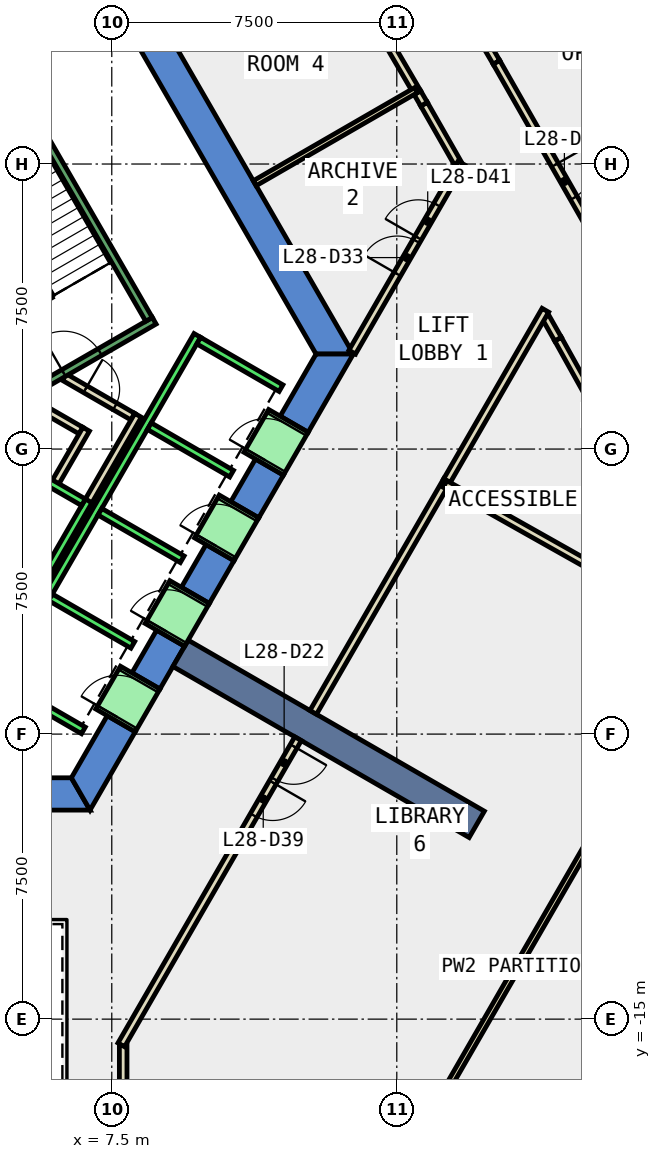
"""IFC4 building model, lengths in metres.
Left out: names, types, materials, properties, quantities, classifications, styles, units other than length and angle.
Written with IfcOpenShell. Run it as: python <this file> out.ifc"""

import sys

from ifc_helpers import new_model, si_unit, direction, frame, frame_2d, origin, place, context, subcontext, project, spatial, polyline, rectangle, outline, extrude, element, fill, save


model = new_model("IFC4")
c1 = context("Model", 3, precision=1e-05, world=origin(), true_north=direction((0.0, 1.0)))
c2 = subcontext(c1, "Body", "Model", "MODEL_VIEW")
j1 = project(units=[si_unit("LENGTHUNIT", "METRE"), si_unit("PLANEANGLEUNIT", "RADIAN")], contexts=[c1])
p1 = place(None, origin())
s1 = spatial("IfcSite", under=j1, at=p1, CompositionType="ELEMENT")
p2 = place(p1, origin())
s2 = spatial("IfcBuilding", under=s1, at=p2, CompositionType="ELEMENT")
p3 = place(p2, frame((0.0, 0.0, 128.6)))
s3 = spatial("IfcBuildingStorey", under=s2, at=p3, CompositionType="ELEMENT", Elevation=128.6)
p4 = place(p3, frame((0.0, 0.0, -0.4)))
e1 = element("IfcWall", 1, at=p4, inside=s3, PredefinedType="SHEAR", context=c2, shape_type="SweptSolid", body=[
    extrude(outline(polyline([(8.517, 11.748), (7.781, 11.323), (12.875, 2.5), (13.856, 2.5), (8.517, 11.748)])), origin(), (0.0, 0.0, 1.0), 4.0),
])
p5 = place(p3, frame((0.0, 0.0, -0.4)))
e2 = element("IfcWall", 2, at=p5, inside=s3, PredefinedType="SHEAR", context=c2, shape_type="SweptSolid", body=[
    extrude(outline(polyline([(5.75, -8.65), (5.75, -9.5), (6.928, -9.5), (6.437, -8.65), (5.75, -8.65)])), origin(), (0.0, 0.0, 1.0), 4.0),
])
p6 = place(p3, frame((0.0, 0.0, -0.4)))
e3 = element("IfcWall", 3, at=p6, inside=s3, PredefinedType="SHEAR", context=c2, shape_type="SweptSolid", body=[
    extrude(outline(polyline([(8.117, -7.44), (7.381, -7.015), (6.437, -8.65), (6.928, -9.5), (8.117, -7.44)])), origin(), (0.0, 0.0, 1.0), 4.0),
])
p7 = place(p3, frame((0.0, 0.0, -0.4)))
e4 = element("IfcWall", 4, at=p7, inside=s3, PredefinedType="SHEAR", context=c2, shape_type="SweptSolid", body=[
    extrude(outline(polyline([(9.417, -5.189), (8.681, -4.764), (8.031, -5.889), (8.767, -6.314), (9.417, -5.189)])), origin(), (0.0, 0.0, 1.0), 4.0),
])
p8 = place(p3, frame((0.0, 0.0, -0.4)))
e5 = element("IfcWall", 5, at=p8, inside=s3, PredefinedType="SHEAR", context=c2, shape_type="SweptSolid", body=[
    extrude(outline(polyline([(10.717, -2.937), (9.981, -2.512), (9.331, -3.638), (10.067, -4.063), (10.717, -2.937)])), origin(), (0.0, 0.0, 1.0), 4.0),
])
p9 = place(p3, frame((0.0, 0.0, -0.4)))
e6 = element("IfcWall", 6, at=p9, inside=s3, PredefinedType="SHEAR", context=c2, shape_type="SweptSolid", body=[
    extrude(outline(polyline([(12.017, -0.686), (11.281, -0.261), (10.631, -1.386), (11.367, -1.811), (12.017, -0.686)])), origin(), (0.0, 0.0, 1.0), 4.0),
])
p10 = place(p3, frame((0.0, 0.0, -0.4)))
e7 = element("IfcWall", 7, at=p10, inside=s3, PredefinedType="SHEAR", context=c2, shape_type="SweptSolid", body=[
    extrude(outline(polyline([(11.931, 0.865), (12.667, 0.44), (13.856, 2.5), (12.875, 2.5), (11.931, 0.865)])), origin(), (0.0, 0.0, 1.0), 4.0),
])
p11 = place(p3, frame((9.31, -5.375, -0.4), z_axis=(0.0, 0.0, 1.0), x_axis=(0.866017533419, -0.500013631625, 0.0)))
e8 = element("IfcWall", 8, at=p11, inside=s3, PredefinedType="SHEAR", context=c2, shape_type="SweptSolid", body=[
    extrude(rectangle(XDim=9.0, YDim=0.8, at=frame_2d((4.5, 0.0))), origin(), (0.0, 0.0, 1.0), 4.0),
])
p12 = place(p3, frame((16.601, 7.526, 0.0), z_axis=(0.0, 0.0, 1.0), x_axis=(-0.495652400286, 0.868520983103, 0.0)))
e9 = element("IfcWall", 9, at=p12, inside=s3, PredefinedType="PARTITIONING", context=c2, shape_type="SweptSolid", body=[
    extrude(rectangle(XDim=1.784, YDim=0.2, at=frame_2d((0.892, 0.0))), origin(), (0.0, 0.0, 1.0), 3.6),
])
p13 = place(p3, frame((15.717, 9.075, 0.0), z_axis=(0.0, 0.0, 1.0), x_axis=(-0.50235401398, 0.864662040706, 0.0)))
e10 = element("IfcWall", 10, at=p13, inside=s3, PredefinedType="PARTITIONING", context=c2, shape_type="SweptSolid", body=[
    extrude(rectangle(XDim=0.35, YDim=0.2, at=frame_2d((0.175, 0.0))), origin(), (0.0, 0.0, 1.0), 3.6),
])
p14 = place(p3, frame((15.541, 9.378, 0.0), z_axis=(0.0, 0.0, 1.0), x_axis=(-0.504428354193, 0.863453551435, 0.0)))
e11 = element("IfcWall", 11, at=p14, inside=s3, PredefinedType="PARTITIONING", context=c2, shape_type="SweptSolid", body=[
    extrude(rectangle(XDim=5.365, YDim=0.2, at=frame_2d((2.682, 0.0))), origin(), (0.0, 0.0, 1.0), 3.6),
])
p15 = place(p14, frame((2.182, 0.0, 0.0)))
e12 = element("IfcOpeningElement", 12, at=p15, cuts=e11, PredefinedType="OPENING", context=c2, shape_type="SweptSolid", body=[
    extrude(rectangle(XDim=1.0, YDim=2.1, at=frame_2d((0.5, 1.05))), frame((0.0, 0.11, 0.0), z_axis=(0.0, -1.0, 0.0), x_axis=(1.0, 0.0, 0.0)), (0.0, 0.0, 1.0), 0.22),
])
p16 = place(p3, frame((22.702, -3.321, 0.0), z_axis=(0.0, 0.0, 1.0), x_axis=(-0.486304341235, 0.873789498504, 0.0)))
e13 = element("IfcWall", 13, at=p16, inside=s3, PredefinedType="PARTITIONING", context=c2, shape_type="SweptSolid", body=[
    extrude(rectangle(XDim=7.113, YDim=0.2, at=frame_2d((3.556, 0.0))), origin(), (0.0, 0.0, 1.0), 3.6),
])
p17 = place(p16, frame((3.057, 0.0, 0.0)))
e14 = element("IfcOpeningElement", 14, at=p17, cuts=e13, PredefinedType="OPENING", context=c2, shape_type="SweptSolid", body=[
    extrude(rectangle(XDim=1.0, YDim=2.1, at=frame_2d((0.5, 1.05))), frame((0.0, 0.11, 0.0), z_axis=(0.0, -1.0, 0.0), x_axis=(1.0, 0.0, 0.0)), (0.0, 0.0, 1.0), 0.22),
])
p18 = place(p3, frame((19.243, 2.894, 0.0), z_axis=(0.0, 0.0, 1.0), x_axis=(-0.494108984218, 0.869399972231, 0.0)))
e15 = element("IfcWall", 15, at=p18, inside=s3, PredefinedType="PARTITIONING", context=c2, shape_type="SweptSolid", body=[
    extrude(rectangle(XDim=0.674, YDim=0.2, at=frame_2d((0.337, 0.0))), origin(), (0.0, 0.0, 1.0), 3.6),
])
p19 = place(p3, frame((15.86, 13.193, 0.0), z_axis=(0.0, 0.0, 1.0), x_axis=(0.504383407959, -0.863479807393, 0.0)))
e16 = element("IfcWall", 16, at=p19, inside=s3, PredefinedType="PARTITIONING", context=c2, shape_type="SweptSolid", body=[
    extrude(rectangle(XDim=3.495, YDim=0.2, at=frame_2d((1.748, 0.0))), origin(), (0.0, 0.0, 1.0), 3.6),
])
p20 = place(p3, frame((17.623, 10.175, 0.0), z_axis=(0.0, 0.0, 1.0), x_axis=(0.4954688358, -0.868625714995, 0.0)))
e17 = element("IfcWall", 17, at=p20, inside=s3, PredefinedType="PARTITIONING", context=c2, shape_type="SweptSolid", body=[
    extrude(rectangle(XDim=7.064, YDim=0.2, at=frame_2d((3.532, 0.0))), origin(), (0.0, 0.0, 1.0), 3.6),
])
p21 = place(p20, frame((3.107, 0.0, 0.0)))
e18 = element("IfcOpeningElement", 18, at=p21, cuts=e17, PredefinedType="OPENING", context=c2, shape_type="SweptSolid", body=[
    extrude(rectangle(XDim=1.0, YDim=2.1, at=frame_2d((0.5, 1.05))), frame((0.0, 0.11, 0.0), z_axis=(0.0, -1.0, 0.0), x_axis=(1.0, 0.0, 0.0)), (0.0, 0.0, 1.0), 0.22),
])
p22 = place(p3, frame((5.499, 1.172, 0.0), z_axis=(0.0, 0.0, 1.0), x_axis=(0.866333505267, -0.499465972466, 0.0)))
e19 = element("IfcWall", 19, at=p22, inside=s3, PredefinedType="PARTITIONING", context=c2, shape_type="SweptSolid", body=[
    extrude(rectangle(XDim=1.374, YDim=0.2, at=frame_2d((0.687, 0.0))), origin(), (0.0, 0.0, 1.0), 3.6),
])
p23 = place(p3, frame((6.826, 0.522, 0.0), z_axis=(0.0, 0.0, 1.0), x_axis=(-0.500016722714, -0.866015748706, 0.0)))
e20 = element("IfcWall", 20, at=p23, inside=s3, PredefinedType="PARTITIONING", context=c2, shape_type="SweptSolid", body=[
    extrude(rectangle(XDim=1.7, YDim=0.2, at=frame_2d((0.85, 0.0))), origin(), (0.0, 0.0, 1.0), 3.6),
])
p24 = place(p3, frame((6.25, 1.894, 0.0), z_axis=(0.0, 0.0, 1.0), x_axis=(0.866043184279, -0.499969202016, 0.0)))
e21 = element("IfcWall", 21, at=p24, inside=s3, PredefinedType="PARTITIONING", context=c2, shape_type="SweptSolid", body=[
    extrude(rectangle(XDim=2.084, YDim=0.2, at=frame_2d((1.042, 0.0))), origin(), (0.0, 0.0, 1.0), 3.6),
])
p25 = place(p24, frame((0.642, 0.0, 0.0)))
e22 = element("IfcOpeningElement", 22, at=p25, cuts=e21, PredefinedType="OPENING", context=c2, shape_type="SweptSolid", body=[
    extrude(rectangle(XDim=0.9, YDim=2.1, at=frame_2d((0.45, 1.05))), frame((0.0, 0.11, 0.0), z_axis=(0.0, -1.0, 0.0), x_axis=(1.0, 0.0, 0.0)), (0.0, 0.0, 1.0), 0.22),
])
p26 = place(p3, frame((8.192, 0.888, 0.0), z_axis=(0.0, 0.0, 1.0), x_axis=(-0.499940625693, -0.866059680843, 0.0)))
e23 = element("IfcWall", 23, at=p26, inside=s3, PredefinedType="PARTITIONING", context=c2, shape_type="SweptSolid", body=[
    extrude(rectangle(XDim=2.68, YDim=0.2, at=frame_2d((1.34, 0.0))), origin(), (0.0, 0.0, 1.0), 3.6),
])
p27 = place(p3, frame((11.261, 6.994, 0.0), z_axis=(0.0, 0.0, 1.0), x_axis=(0.866013769041, 0.500020151426, 0.0)))
e24 = element("IfcWall", 24, at=p27, inside=s3, PredefinedType="PARTITIONING", context=c2, shape_type="SweptSolid", body=[
    extrude(rectangle(XDim=4.898, YDim=0.15, at=frame_2d((2.449, 0.0))), origin(), (0.0, 0.0, 1.0), 3.6),
])
p28 = place(p3, frame((13.827, 2.55, 0.0), z_axis=(0.0, 0.0, 1.0), x_axis=(0.500032637853, 0.866006559491, 0.0)))
e25 = element("IfcWall", 25, at=p28, inside=s3, PredefinedType="PARTITIONING", context=c2, shape_type="SweptSolid", body=[
    extrude(rectangle(XDim=5.746, YDim=0.2, at=frame_2d((2.873, 0.0))), origin(), (0.0, 0.0, 1.0), 3.6),
])
p29 = place(p28, frame((2.373, 0.0, 0.0)))
e26 = element("IfcOpeningElement", 26, at=p29, cuts=e25, PredefinedType="OPENING", context=c2, shape_type="SweptSolid", body=[
    extrude(rectangle(XDim=1.0, YDim=2.1, at=frame_2d((0.5, 1.05))), frame((0.0, 0.11, 0.0), z_axis=(0.0, -1.0, 0.0), x_axis=(1.0, 0.0, 0.0)), (0.0, 0.0, 1.0), 0.22),
])
p30 = place(p28, frame((3.473, 0.0, 0.0)))
e27 = element("IfcOpeningElement", 27, at=p30, cuts=e25, PredefinedType="OPENING", context=c2, shape_type="SweptSolid", body=[
    extrude(rectangle(XDim=1.0, YDim=2.1, at=frame_2d((0.5, 1.05))), frame((0.0, 0.11, 0.0), z_axis=(0.0, -1.0, 0.0), x_axis=(1.0, 0.0, 0.0)), (0.0, 0.0, 1.0), 0.22),
])
p31 = place(p3, frame((7.8, -15.69, 0.0), z_axis=(0.0, 0.0, 1.0), x_axis=(0.0, -1.0, 0.0)))
e28 = element("IfcWall", 28, at=p31, inside=s3, PredefinedType="PARTITIONING", context=c2, shape_type="SweptSolid", body=[
    extrude(rectangle(XDim=2.924, YDim=0.2, at=frame_2d((1.462, 0.0))), origin(), (0.0, 0.0, 1.0), 3.6),
])
p32 = place(p3, frame((16.32, -0.832, 0.0), z_axis=(0.0, 0.0, 1.0), x_axis=(-0.499951642806, -0.866053321023, 0.0)))
e29 = element("IfcWall", 29, at=p32, inside=s3, PredefinedType="PARTITIONING", context=c2, shape_type="SweptSolid", body=[
    extrude(rectangle(XDim=7.039, YDim=0.2, at=frame_2d((3.52, 0.0))), origin(), (0.0, 0.0, 1.0), 3.6),
])
p33 = place(p3, frame((18.91, 3.653, 0.0), z_axis=(0.0, 0.0, 1.0), x_axis=(-0.500052967229, -0.865994820981, 0.0)))
e30 = element("IfcWall", 30, at=p33, inside=s3, PredefinedType="PARTITIONING", context=c2, shape_type="SweptSolid", body=[
    extrude(rectangle(XDim=5.179, YDim=0.2, at=frame_2d((2.59, 0.0))), origin(), (0.0, 0.0, 1.0), 3.6),
])
p34 = place(p3, frame((16.27, -0.919, 0.0), z_axis=(0.0, 0.0, 1.0), x_axis=(0.871308980511, -0.490734816863, 0.0)))
e31 = element("IfcWall", 31, at=p34, inside=s3, PredefinedType="PARTITIONING", context=c2, shape_type="SweptSolid", body=[
    extrude(rectangle(XDim=8.1, YDim=0.2, at=frame_2d((4.05, 0.0))), origin(), (0.0, 0.0, 1.0), 3.6),
])
p35 = place(p3, frame((20.924, -8.858, 0.0), z_axis=(0.0, 0.0, 1.0), x_axis=(-0.499996828157, -0.866027235041, 0.0)))
e32 = element("IfcWall", 32, at=p35, inside=s3, PredefinedType="PARTITIONING", context=c2, shape_type="SweptSolid", body=[
    extrude(rectangle(XDim=11.04, YDim=0.15, at=frame_2d((5.52, 0.0))), origin(), (0.0, 0.0, 1.0), 3.6),
])
p36 = place(p3, frame((12.401, -7.621, 0.0), z_axis=(0.0, 0.0, 1.0), x_axis=(-0.499983724212, -0.866034800411, 0.0)))
e33 = element("IfcWall", 33, at=p36, inside=s3, PredefinedType="PARTITIONING", context=c2, shape_type="SweptSolid", body=[
    extrude(rectangle(XDim=9.302, YDim=0.2, at=frame_2d((4.651, 0.0))), origin(), (0.0, 0.0, 1.0), 3.6),
])
p37 = place(p36, frame((0.231, 0.0, 0.0)))
e34 = element("IfcOpeningElement", 34, at=p37, cuts=e33, PredefinedType="OPENING", context=c2, shape_type="SweptSolid", body=[
    extrude(rectangle(XDim=1.0, YDim=2.1, at=frame_2d((0.5, 1.05))), frame((0.0, 0.11, 0.0), z_axis=(0.0, -1.0, 0.0), x_axis=(1.0, 0.0, 0.0)), (0.0, 0.0, 1.0), 0.22),
])
p38 = place(p36, frame((1.331, 0.0, 0.0)))
e35 = element("IfcOpeningElement", 35, at=p38, cuts=e33, PredefinedType="OPENING", context=c2, shape_type="SweptSolid", body=[
    extrude(rectangle(XDim=1.0, YDim=2.1, at=frame_2d((0.5, 1.05))), frame((0.0, 0.11, 0.0), z_axis=(0.0, -1.0, 0.0), x_axis=(1.0, 0.0, 0.0)), (0.0, 0.0, 1.0), 0.22),
])
p39 = place(p3, frame((5.492, -3.788, 0.0), z_axis=(0.0, 0.0, 1.0), x_axis=(0.500011755427, 0.866018616679, 0.0)))
e36 = element("IfcWall", 36, at=p39, inside=s3, PredefinedType="STANDARD", context=c2, shape_type="SweptSolid", body=[
    extrude(rectangle(XDim=2.8, YDim=0.2, at=frame_2d((1.4, 0.0))), origin(), (0.0, 0.0, 1.0), 3.6),
])
p40 = place(p3, frame((4.677, -0.2, 0.0), z_axis=(0.0, 0.0, 1.0), x_axis=(0.865973769406, -0.500089422704, 0.0)))
e37 = element("IfcWall", 37, at=p40, inside=s3, PredefinedType="STANDARD", context=c2, shape_type="SweptSolid", body=[
    extrude(rectangle(XDim=2.399, YDim=0.2, at=frame_2d((1.2, 0.0))), origin(), (0.0, 0.0, 1.0), 3.6),
])
p41 = place(p3, frame((4.451, -6.19, 0.0), z_axis=(0.0, 0.0, 1.0), x_axis=(0.50000090737, 0.866024879913, 0.0)))
e38 = element("IfcWall", 38, at=p41, inside=s3, PredefinedType="STANDARD", context=c2, shape_type="SweptSolid", body=[
    extrude(rectangle(XDim=10.6, YDim=0.2, at=frame_2d((5.3, 0.0))), origin(), (0.0, 0.0, 1.0), 3.6),
])
for number, where, z_axis, x_axis in (
    (39, (4.588, -6.153, 0.0), (0.0, 0.0, 1.0), (0.866, -0.5, 0.0)),
    (40, (5.888, -3.902, 0.0), (0.0, 0.0, 1.0), (0.866, -0.5, 0.0)),
    (41, (7.188, -1.65, 0.0), (0.0, 0.0, 1.0), (0.866, -0.5, 0.0)),
    (42, (8.488, 0.602, 0.0), (0.0, 0.0, 1.0), (0.866, -0.5, 0.0)),
):
    element("IfcWall", number, at=place(p3, frame(where, z_axis=z_axis, x_axis=x_axis)), inside=s3, PredefinedType="STANDARD", context=c2, shape_type="SweptSolid", body=[
        extrude(rectangle(XDim=2.5, YDim=0.2, at=frame_2d((1.25, 0.0))), origin(), (0.0, 0.0, 1.0), 3.6),
    ])
p42 = place(p3, frame((9.788, 2.853, 0.0), z_axis=(0.0, 0.0, 1.0), x_axis=(0.865998541277, -0.500046524342, 0.0)))
e43 = element("IfcWall", 43, at=p42, inside=s3, PredefinedType="STANDARD", context=c2, shape_type="SweptSolid", body=[
    extrude(rectangle(XDim=2.5, YDim=0.2, at=frame_2d((1.25, 0.0))), origin(), (0.0, 0.0, 1.0), 3.6),
])
p43 = place(p3, frame((7.598, -7.14, 0.0), z_axis=(0.0, 0.0, 1.0), x_axis=(0.500362116554, 0.865816234728, 0.0)))
e44 = element("IfcWall", 44, at=p43, inside=s3, PredefinedType="STANDARD", context=c2, shape_type="SweptSolid", body=[
    extrude(rectangle(XDim=1.299, YDim=1.2, at=frame_2d((0.65, 0.0))), origin(), (0.0, 0.0, 1.0), 2.4),
])
p44 = place(p43, frame((0.1, 0.0, 0.0)))
e45 = element("IfcOpeningElement", 45, at=p44, cuts=e44, PredefinedType="OPENING", context=c2, shape_type="SweptSolid", body=[
    extrude(rectangle(XDim=1.1, YDim=2.3, at=frame_2d((0.55, 1.15))), frame((0.0, 0.61, 0.0), z_axis=(0.0, -1.0, 0.0), x_axis=(1.0, 0.0, 0.0)), (0.0, 0.0, 1.0), 1.22),
])
p45 = place(p3, frame((8.898, -4.889, 0.0), z_axis=(0.0, 0.0, 1.0), x_axis=(0.500036693733, 0.866004217611, 0.0)))
e46 = element("IfcWall", 46, at=p45, inside=s3, PredefinedType="STANDARD", context=c2, shape_type="SweptSolid", body=[
    extrude(rectangle(XDim=1.3, YDim=1.2, at=frame_2d((0.65, 0.0))), origin(), (0.0, 0.0, 1.0), 2.4),
])
p46 = place(p45, frame((0.1, 0.0, 0.0)))
e47 = element("IfcOpeningElement", 47, at=p46, cuts=e46, PredefinedType="OPENING", context=c2, shape_type="SweptSolid", body=[
    extrude(rectangle(XDim=1.1, YDim=2.3, at=frame_2d((0.55, 1.15))), frame((0.0, 0.61, 0.0), z_axis=(0.0, -1.0, 0.0), x_axis=(1.0, 0.0, 0.0)), (0.0, 0.0, 1.0), 1.22),
])
p47 = place(p3, frame((10.198, -2.637, 0.0), z_axis=(0.0, 0.0, 1.0), x_axis=(0.49989585183, 0.866085525409, 0.0)))
e48 = element("IfcWall", 48, at=p47, inside=s3, PredefinedType="STANDARD", context=c2, shape_type="SweptSolid", body=[
    extrude(rectangle(XDim=1.3, YDim=1.2, at=frame_2d((0.65, 0.0))), origin(), (0.0, 0.0, 1.0), 2.4),
])
p48 = place(p47, frame((0.1, 0.0, 0.0)))
e49 = element("IfcOpeningElement", 49, at=p48, cuts=e48, PredefinedType="OPENING", context=c2, shape_type="SweptSolid", body=[
    extrude(rectangle(XDim=1.1, YDim=2.3, at=frame_2d((0.55, 1.15))), frame((0.0, 0.61, 0.0), z_axis=(0.0, -1.0, 0.0), x_axis=(1.0, 0.0, 0.0)), (0.0, 0.0, 1.0), 1.22),
])
p49 = place(p3, frame((11.498, -0.385, 0.0), z_axis=(0.0, 0.0, 1.0), x_axis=(0.500221244143, 0.865897630733, 0.0)))
e50 = element("IfcWall", 50, at=p49, inside=s3, PredefinedType="STANDARD", context=c2, shape_type="SweptSolid", body=[
    extrude(rectangle(XDim=1.299, YDim=1.2, at=frame_2d((0.65, 0.0))), origin(), (0.0, 0.0, 1.0), 2.4),
])
p50 = place(p49, frame((0.1, 0.0, 0.0)))
e51 = element("IfcOpeningElement", 51, at=p50, cuts=e50, PredefinedType="OPENING", context=c2, shape_type="SweptSolid", body=[
    extrude(rectangle(XDim=1.1, YDim=2.3, at=frame_2d((0.55, 1.15))), frame((0.0, 0.61, 0.0), z_axis=(0.0, -1.0, 0.0), x_axis=(1.0, 0.0, 0.0)), (0.0, 0.0, 1.0), 1.22),
])
p51 = place(p3, frame((4.806, 1.176, 0.0), z_axis=(0.0, 0.0, 1.0), x_axis=(0.866059941101, 0.499940174841, 0.0)))
e52 = element("IfcWall", 52, at=p51, inside=s3, PredefinedType="STANDARD", context=c2, shape_type="SweptSolid", body=[
    extrude(rectangle(XDim=4.4, YDim=0.2, at=frame_2d((2.2, 0.0))), origin(), (0.0, 0.0, 1.0), 3.6),
])
p52 = place(p51, frame((1.65, 0.0, 0.0)))
e53 = element("IfcOpeningElement", 53, at=p52, cuts=e52, PredefinedType="OPENING", context=c2, shape_type="SweptSolid", body=[
    extrude(rectangle(XDim=1.1, YDim=2.2, at=frame_2d((0.55, 1.1))), frame((0.0, 0.11, 0.0), z_axis=(0.0, -1.0, 0.0), x_axis=(1.0, 0.0, 0.0)), (0.0, 0.0, 1.0), 0.22),
])
p53 = place(p3, frame((8.48, 3.412, 0.0), z_axis=(0.0, 0.0, 1.0), x_axis=(-0.499978703459, 0.866037698999, 0.0)))
e54 = element("IfcWall", 54, at=p53, inside=s3, PredefinedType="STANDARD", context=c2, shape_type="SweptSolid", body=[
    extrude(rectangle(XDim=6.9, YDim=0.2, at=frame_2d((3.45, 0.0))), origin(), (0.0, 0.0, 1.0), 3.6),
])
p54 = place(p21, origin())
e55 = element("IfcDoor", 55, at=p54, inside=s3, OperationType="SINGLE_SWING_LEFT", PredefinedType="DOOR", context=c2, shape_type="SweptSolid", body=[
    extrude(rectangle(XDim=1.0, YDim=2.1, at=frame_2d((0.5, 1.05))), frame((0.0, 0.025, 0.0), z_axis=(0.0, -1.0, 0.0), x_axis=(1.0, 0.0, 0.0)), (0.0, 0.0, 1.0), 0.05),
])
fill(e18, e55)
p55 = place(p37, origin())
e56 = element("IfcDoor", 56, at=p55, inside=s3, OperationType="SINGLE_SWING_LEFT", PredefinedType="DOOR", context=c2, shape_type="SweptSolid", body=[
    extrude(rectangle(XDim=1.0, YDim=2.1, at=frame_2d((0.5, 1.05))), frame((0.0, 0.025, 0.0), z_axis=(0.0, -1.0, 0.0), x_axis=(1.0, 0.0, 0.0)), (0.0, 0.0, 1.0), 0.05),
])
fill(e34, e56)
p56 = place(p29, origin())
e57 = element("IfcDoor", 57, at=p56, inside=s3, OperationType="SINGLE_SWING_LEFT", PredefinedType="DOOR", context=c2, shape_type="SweptSolid", body=[
    extrude(rectangle(XDim=1.0, YDim=2.1, at=frame_2d((0.5, 1.05))), frame((0.0, 0.025, 0.0), z_axis=(0.0, -1.0, 0.0), x_axis=(1.0, 0.0, 0.0)), (0.0, 0.0, 1.0), 0.05),
])
fill(e26, e57)
p57 = place(p25, origin())
e58 = element("IfcDoor", 58, at=p57, inside=s3, OperationType="SINGLE_SWING_LEFT", PredefinedType="DOOR", context=c2, shape_type="SweptSolid", body=[
    extrude(rectangle(XDim=0.9, YDim=2.1, at=frame_2d((0.45, 1.05))), frame((0.0, 0.025, 0.0), z_axis=(0.0, -1.0, 0.0), x_axis=(1.0, 0.0, 0.0)), (0.0, 0.0, 1.0), 0.05),
])
fill(e22, e58)
p58 = place(p38, origin())
e59 = element("IfcDoor", 59, at=p58, inside=s3, OperationType="SINGLE_SWING_RIGHT", PredefinedType="DOOR", context=c2, shape_type="SweptSolid", body=[
    extrude(rectangle(XDim=1.0, YDim=2.1, at=frame_2d((0.5, 1.05))), frame((0.0, 0.025, 0.0), z_axis=(0.0, -1.0, 0.0), x_axis=(1.0, 0.0, 0.0)), (0.0, 0.0, 1.0), 0.05),
])
fill(e35, e59)
p59 = place(p30, origin())
e60 = element("IfcDoor", 60, at=p59, inside=s3, OperationType="SINGLE_SWING_RIGHT", PredefinedType="DOOR", context=c2, shape_type="SweptSolid", body=[
    extrude(rectangle(XDim=1.0, YDim=2.1, at=frame_2d((0.5, 1.05))), frame((0.0, 0.025, 0.0), z_axis=(0.0, -1.0, 0.0), x_axis=(1.0, 0.0, 0.0)), (0.0, 0.0, 1.0), 0.05),
])
fill(e27, e60)
p60 = place(p44, origin())
e61 = element("IfcDoor", 61, at=p60, inside=s3, OperationType="SLIDING_TO_LEFT", PredefinedType="DOOR", context=c2, shape_type="SweptSolid", body=[
    extrude(rectangle(XDim=1.1, YDim=2.3, at=frame_2d((0.55, 1.15))), frame((0.0, 0.025, 0.0), z_axis=(0.0, -1.0, 0.0), x_axis=(1.0, 0.0, 0.0)), (0.0, 0.0, 1.0), 0.05),
])
fill(e45, e61)
p61 = place(p46, origin())
e62 = element("IfcDoor", 62, at=p61, inside=s3, OperationType="SLIDING_TO_LEFT", PredefinedType="DOOR", context=c2, shape_type="SweptSolid", body=[
    extrude(rectangle(XDim=1.1, YDim=2.3, at=frame_2d((0.55, 1.15))), frame((0.0, 0.025, 0.0), z_axis=(0.0, -1.0, 0.0), x_axis=(1.0, 0.0, 0.0)), (0.0, 0.0, 1.0), 0.05),
])
fill(e47, e62)
p62 = place(p48, origin())
e63 = element("IfcDoor", 63, at=p62, inside=s3, OperationType="SLIDING_TO_LEFT", PredefinedType="DOOR", context=c2, shape_type="SweptSolid", body=[
    extrude(rectangle(XDim=1.1, YDim=2.3, at=frame_2d((0.55, 1.15))), frame((0.0, 0.025, 0.0), z_axis=(0.0, -1.0, 0.0), x_axis=(1.0, 0.0, 0.0)), (0.0, 0.0, 1.0), 0.05),
])
fill(e49, e63)
p63 = place(p50, origin())
e64 = element("IfcDoor", 64, at=p63, inside=s3, OperationType="SLIDING_TO_LEFT", PredefinedType="DOOR", context=c2, shape_type="SweptSolid", body=[
    extrude(rectangle(XDim=1.1, YDim=2.3, at=frame_2d((0.55, 1.15))), frame((0.0, 0.025, 0.0), z_axis=(0.0, -1.0, 0.0), x_axis=(1.0, 0.0, 0.0)), (0.0, 0.0, 1.0), 0.05),
])
fill(e51, e64)
p64 = place(p52, origin())
e65 = element("IfcDoor", 65, at=p64, inside=s3, OperationType="SINGLE_SWING_LEFT", PredefinedType="DOOR", context=c2, shape_type="SweptSolid", body=[
    extrude(rectangle(XDim=1.1, YDim=2.2, at=frame_2d((0.55, 1.1))), frame((0.0, 0.025, 0.0), z_axis=(0.0, -1.0, 0.0), x_axis=(1.0, 0.0, 0.0)), (0.0, 0.0, 1.0), 0.05),
])
fill(e53, e65)
save(model, sys.argv[1])
